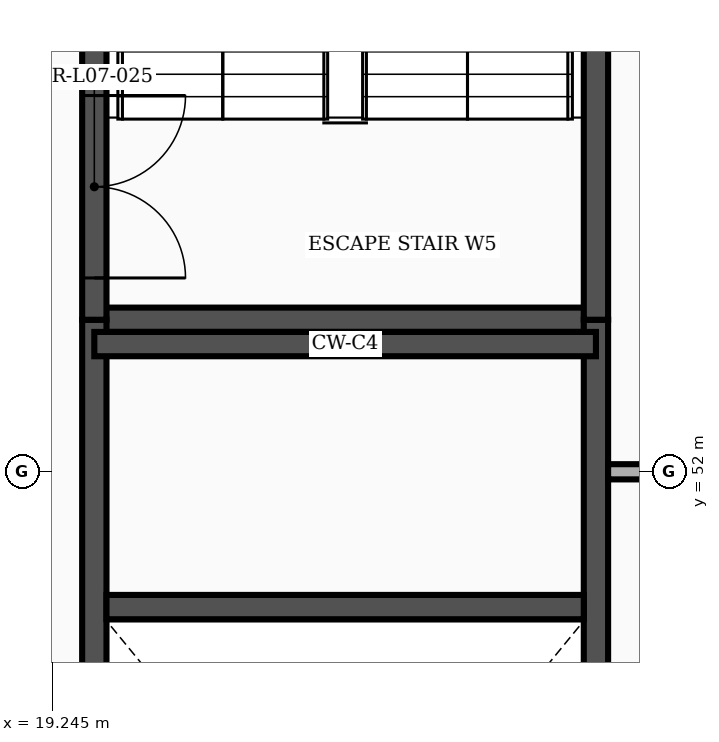
"""IFC4 building model, lengths in metres.
Left out: names, types, materials, properties, quantities, classifications, styles, units other than length and angle.
Written with IfcOpenShell. Run it as: python <this file> out.ifc"""

import sys

from ifc_helpers import new_model, si_unit, direction, frame, frame_2d, origin, place, context, subcontext, project, spatial, rectangle, extrude, element, fill, save


model = new_model("IFC4")
c1 = context("Model", 3, precision=1e-05, world=origin(), true_north=direction((0.0, 1.0)))
c2 = subcontext(c1, "Body", "Model", "MODEL_VIEW")
j1 = project(units=[si_unit("LENGTHUNIT", "METRE"), si_unit("PLANEANGLEUNIT", "RADIAN")], contexts=[c1])
p1 = place(None, origin())
s1 = spatial("IfcSite", under=j1, at=p1, CompositionType="ELEMENT")
p2 = place(p1, origin())
s2 = spatial("IfcBuilding", under=s1, at=p2, CompositionType="ELEMENT")
p3 = place(p2, frame((0.0, 0.0, 33.3)))
s3 = spatial("IfcBuildingStorey", under=s2, at=p3, CompositionType="ELEMENT", Elevation=33.3)
p4 = place(p3, frame((19.8, 54.0, 0.0), z_axis=(0.0, 0.0, 1.0), x_axis=(1.0, 0.0, 0.0)))
e1 = element("IfcWall", 1, at=p4, inside=s3, PredefinedType="SHEAR", context=c2, shape_type="SweptSolid", body=[
    extrude(rectangle(XDim=6.6, YDim=0.32, at=frame_2d((3.3, 0.0))), origin(), (0.0, 0.0, 1.0), 4.255),
])
p5 = place(p3, frame((19.8, 39.4, 0.0), z_axis=(0.0, 0.0, 1.0), x_axis=(0.0, 1.0, 0.0)))
e2 = element("IfcWall", 2, at=p5, inside=s3, PredefinedType="SHEAR", context=c2, shape_type="SweptSolid", body=[
    extrude(rectangle(XDim=14.6, YDim=0.32, at=frame_2d((7.3, 0.0))), origin(), (0.0, 0.0, 1.0), 4.255),
])
p6 = place(p5, frame((0.55, 0.0, 0.0)))
e3 = element("IfcOpeningElement", 3, at=p6, cuts=e2, PredefinedType="OPENING", context=c2, shape_type="SweptSolid", body=[
    extrude(rectangle(XDim=2.4, YDim=2.25, at=frame_2d((1.2, 1.125))), frame((0.0, 0.172, 0.0), z_axis=(0.0, -1.0, 0.0), x_axis=(1.0, 0.0, 0.0)), (0.0, 0.0, 1.0), 0.344),
])
p7 = place(p3, frame((26.4, 39.4, 0.0), z_axis=(0.0, 0.0, 1.0), x_axis=(0.0, 1.0, 0.0)))
e4 = element("IfcWall", 4, at=p7, inside=s3, PredefinedType="SHEAR", context=c2, shape_type="SweptSolid", body=[
    extrude(rectangle(XDim=14.6, YDim=0.32, at=frame_2d((7.3, 0.0))), origin(), (0.0, 0.0, 1.0), 4.255),
])
p8 = place(p3, frame((19.96, 50.22, 0.0), z_axis=(0.0, 0.0, 1.0), x_axis=(1.0, 0.0, 0.0)))
e5 = element("IfcWall", 5, at=p8, inside=s3, PredefinedType="SHEAR", context=c2, shape_type="SweptSolid", body=[
    extrude(rectangle(XDim=6.28, YDim=0.32, at=frame_2d((3.14, 0.0))), origin(), (0.0, 0.0, 1.0), 4.255),
])
p9 = place(p3, frame((19.8, 53.68, 0.0), z_axis=(0.0, 0.0, 1.0), x_axis=(1.0, 0.0, 0.0)))
e6 = element("IfcWall", 6, at=p9, inside=s3, PredefinedType="SHEAR", context=c2, shape_type="SweptSolid", body=[
    extrude(rectangle(XDim=6.6, YDim=0.32, at=frame_2d((3.3, 0.0))), origin(), (0.0, 0.0, 1.0), 4.255),
])
p10 = place(p3, frame((19.8, 54.0, 0.0), z_axis=(0.0, 0.0, 1.0), x_axis=(0.0, 1.0, 0.0)))
e7 = element("IfcWall", 7, at=p10, inside=s3, PredefinedType="SHEAR", context=c2, shape_type="SweptSolid", body=[
    extrude(rectangle(XDim=12.0, YDim=0.32, at=frame_2d((6.0, 0.0))), origin(), (0.0, 0.0, 1.0), 4.255),
])
p11 = place(p10, frame((0.55, 0.0, 0.0)))
e8 = element("IfcOpeningElement", 8, at=p11, cuts=e7, PredefinedType="OPENING", context=c2, shape_type="SweptSolid", body=[
    extrude(rectangle(XDim=2.4, YDim=2.25, at=frame_2d((1.2, 1.125))), frame((0.0, 0.172, 0.0), z_axis=(0.0, -1.0, 0.0), x_axis=(1.0, 0.0, 0.0)), (0.0, 0.0, 1.0), 0.344),
])
p12 = place(p3, frame((26.4, 54.0, 0.0), z_axis=(0.0, 0.0, 1.0), x_axis=(0.0, 1.0, 0.0)))
e9 = element("IfcWall", 9, at=p12, inside=s3, PredefinedType="SHEAR", context=c2, shape_type="SweptSolid", body=[
    extrude(rectangle(XDim=12.0, YDim=0.32, at=frame_2d((6.0, 0.0))), origin(), (0.0, 0.0, 1.0), 4.255),
])
p13 = place(p3, frame((26.56, 52.0, 0.0), z_axis=(0.0, 0.0, 1.0), x_axis=(1.0, 0.0, 0.0)))
e10 = element("IfcWall", 10, at=p13, inside=s3, PredefinedType="PARTITIONING", context=c2, shape_type="SweptSolid", body=[
    extrude(rectangle(XDim=18.27, YDim=0.2, at=frame_2d((9.135, 0.0))), origin(), (0.0, 0.0, 1.0), 3.868),
])
p14 = place(p13, frame((15.46, 0.0, 0.0)))
e11 = element("IfcOpeningElement", 11, at=p14, cuts=e10, PredefinedType="OPENING", context=c2, shape_type="SweptSolid", body=[
    extrude(rectangle(XDim=1.9, YDim=2.35, at=frame_2d((0.95, 1.175))), frame((0.0, 0.112, 0.0), z_axis=(0.0, -1.0, 0.0), x_axis=(1.0, 0.0, 0.0)), (0.0, 0.0, 1.0), 0.224),
])
p15 = place(p11, frame((2.4, 0.0, 0.0), z_axis=(0.0, 0.0, 1.0), x_axis=(-1.0, 0.0, 0.0)))
e12 = element("IfcDoor", 12, at=p15, inside=s3, OperationType="DOUBLE_DOOR_SINGLE_SWING", PredefinedType="DOOR", context=c2, shape_type="SweptSolid", body=[
    extrude(rectangle(XDim=2.4, YDim=2.25, at=frame_2d((1.2, 1.125))), frame((0.0, 0.025, 0.0), z_axis=(0.0, -1.0, 0.0), x_axis=(1.0, 0.0, 0.0)), (0.0, 0.0, 1.0), 0.05),
])
fill(e8, e12)
save(model, sys.argv[1])
